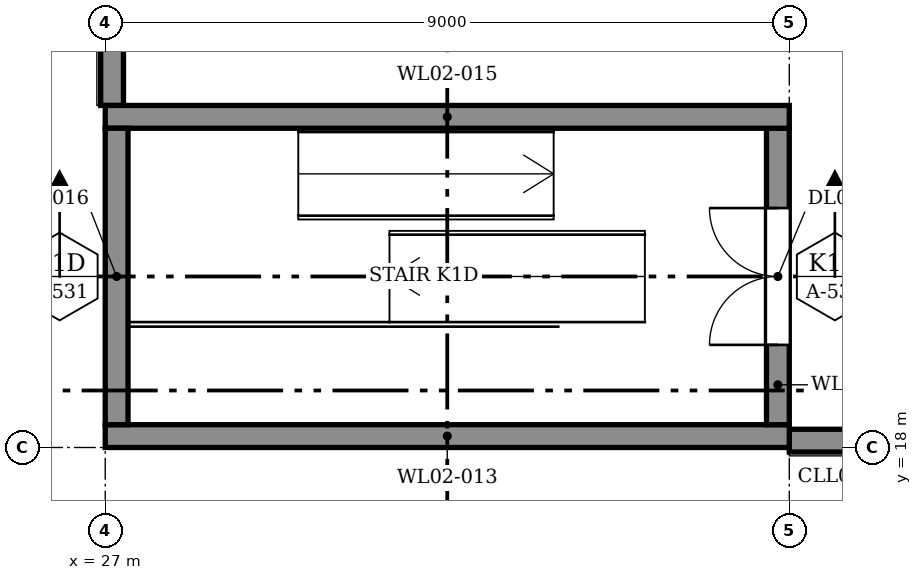
"""IFC4 building model, lengths in metres.
Left out: names, types, materials, properties, quantities, classifications, styles, units other than length and angle.
Written with IfcOpenShell. Run it as: python <this file> out.ifc"""

import sys

from ifc_helpers import new_model, si_unit, direction, frame, frame_2d, origin, place, context, subcontext, project, spatial, rectangle, extrude, element, fill, save


model = new_model("IFC4")
c1 = context("Model", 3, precision=1e-05, world=origin(), true_north=direction((0.0, 1.0)))
c2 = subcontext(c1, "Body", "Model", "MODEL_VIEW")
j1 = project(units=[si_unit("LENGTHUNIT", "METRE"), si_unit("PLANEANGLEUNIT", "RADIAN")], contexts=[c1])
p1 = place(None, origin())
s1 = spatial("IfcSite", under=j1, at=p1, CompositionType="ELEMENT")
p2 = place(p1, origin())
s2 = spatial("IfcBuilding", under=s1, at=p2, CompositionType="ELEMENT")
p3 = place(p2, frame((0.0, 0.0, 9.2)))
s3 = spatial("IfcBuildingStorey", under=s2, at=p3, CompositionType="ELEMENT", Elevation=9.2)
p4 = place(p3, frame((27.09, 22.5, 0.0), z_axis=(0.0, 0.0, 1.0), x_axis=(0.0, 1.0, 0.0)))
e1 = element("IfcWall", 1, at=p4, inside=s3, PredefinedType="SOLIDWALL", context=c2, shape_type="SweptSolid", body=[
    extrude(rectangle(XDim=4.35, YDim=0.3, at=frame_2d((2.175, 0.0))), origin(), (0.0, 0.0, 1.0), 3.578),
])
p5 = place(p3, frame((36.0, 18.09, 0.0), z_axis=(0.0, 0.0, 1.0), x_axis=(1.0, 0.0, 0.0)))
e2 = element("IfcWall", 2, at=p5, inside=s3, PredefinedType="SOLIDWALL", context=c2, shape_type="SweptSolid", body=[
    extrude(rectangle(XDim=8.85, YDim=0.3, at=frame_2d((4.425, 0.0))), origin(), (0.0, 0.0, 1.0), 3.502),
])
p6 = place(p5, frame((1.65, 0.0, 0.9)))
e3 = element("IfcOpeningElement", 3, at=p6, cuts=e2, PredefinedType="OPENING", context=c2, shape_type="SweptSolid", body=[
    extrude(rectangle(XDim=1.2, YDim=2.3, at=frame_2d((0.6, 1.15))), frame((0.0, 0.16, 0.0), z_axis=(0.0, -1.0, 0.0), x_axis=(1.0, 0.0, 0.0)), (0.0, 0.0, 1.0), 0.32),
])
p7 = place(p5, frame((6.15, 0.0, 0.9)))
e4 = element("IfcOpeningElement", 4, at=p7, cuts=e2, PredefinedType="OPENING", context=c2, shape_type="SweptSolid", body=[
    extrude(rectangle(XDim=1.2, YDim=2.3, at=frame_2d((0.6, 1.15))), frame((0.0, 0.16, 0.0), z_axis=(0.0, -1.0, 0.0), x_axis=(1.0, 0.0, 0.0)), (0.0, 0.0, 1.0), 0.32),
])
p8 = place(p3, frame((27.0, 18.15, 0.0), z_axis=(0.0, 0.0, 1.0), x_axis=(1.0, 0.0, 0.0)))
e5 = element("IfcWall", 5, at=p8, inside=s3, PredefinedType="SOLIDWALL", context=c2, shape_type="SweptSolid", body=[
    extrude(rectangle(XDim=9.0, YDim=0.3, at=frame_2d((4.5, 0.0))), origin(), (0.0, 0.0, 1.0), 4.2),
])
p9 = place(p3, frame((35.85, 18.3, 0.0), z_axis=(0.0, 0.0, 1.0), x_axis=(0.0, 1.0, 0.0)))
e6 = element("IfcWall", 6, at=p9, inside=s3, PredefinedType="SOLIDWALL", context=c2, shape_type="SweptSolid", body=[
    extrude(rectangle(XDim=3.9, YDim=0.3, at=frame_2d((1.95, 0.0))), origin(), (0.0, 0.0, 1.0), 4.2),
])
p10 = place(p9, frame((1.05, 0.0, 0.0)))
e7 = element("IfcOpeningElement", 7, at=p10, cuts=e6, PredefinedType="OPENING", context=c2, shape_type="SweptSolid", body=[
    extrude(rectangle(XDim=1.8, YDim=2.1, at=frame_2d((0.9, 1.05))), frame((0.0, 0.16, 0.0), z_axis=(0.0, -1.0, 0.0), x_axis=(1.0, 0.0, 0.0)), (0.0, 0.0, 1.0), 0.32),
])
p11 = place(p3, frame((27.0, 22.35, 0.0), z_axis=(0.0, 0.0, 1.0), x_axis=(1.0, 0.0, 0.0)))
e8 = element("IfcWall", 8, at=p11, inside=s3, PredefinedType="SOLIDWALL", context=c2, shape_type="SweptSolid", body=[
    extrude(rectangle(XDim=9.0, YDim=0.3, at=frame_2d((4.5, 0.0))), origin(), (0.0, 0.0, 1.0), 4.2),
])
p12 = place(p3, frame((27.15, 18.3, 0.0), z_axis=(0.0, 0.0, 1.0), x_axis=(0.0, 1.0, 0.0)))
e9 = element("IfcWall", 9, at=p12, inside=s3, PredefinedType="SOLIDWALL", context=c2, shape_type="SweptSolid", body=[
    extrude(rectangle(XDim=3.9, YDim=0.3, at=frame_2d((1.95, 0.0))), origin(), (0.0, 0.0, 1.0), 4.2),
])
p13 = place(p10, origin())
e10 = element("IfcDoor", 10, at=p13, inside=s3, OperationType="DOUBLE_DOOR_SINGLE_SWING", PredefinedType="DOOR", context=c2, shape_type="SweptSolid", body=[
    extrude(rectangle(XDim=1.8, YDim=2.1, at=frame_2d((0.9, 1.05))), frame((0.0, 0.025, 0.0), z_axis=(0.0, -1.0, 0.0), x_axis=(1.0, 0.0, 0.0)), (0.0, 0.0, 1.0), 0.05),
])
fill(e7, e10)
save(model, sys.argv[1])
